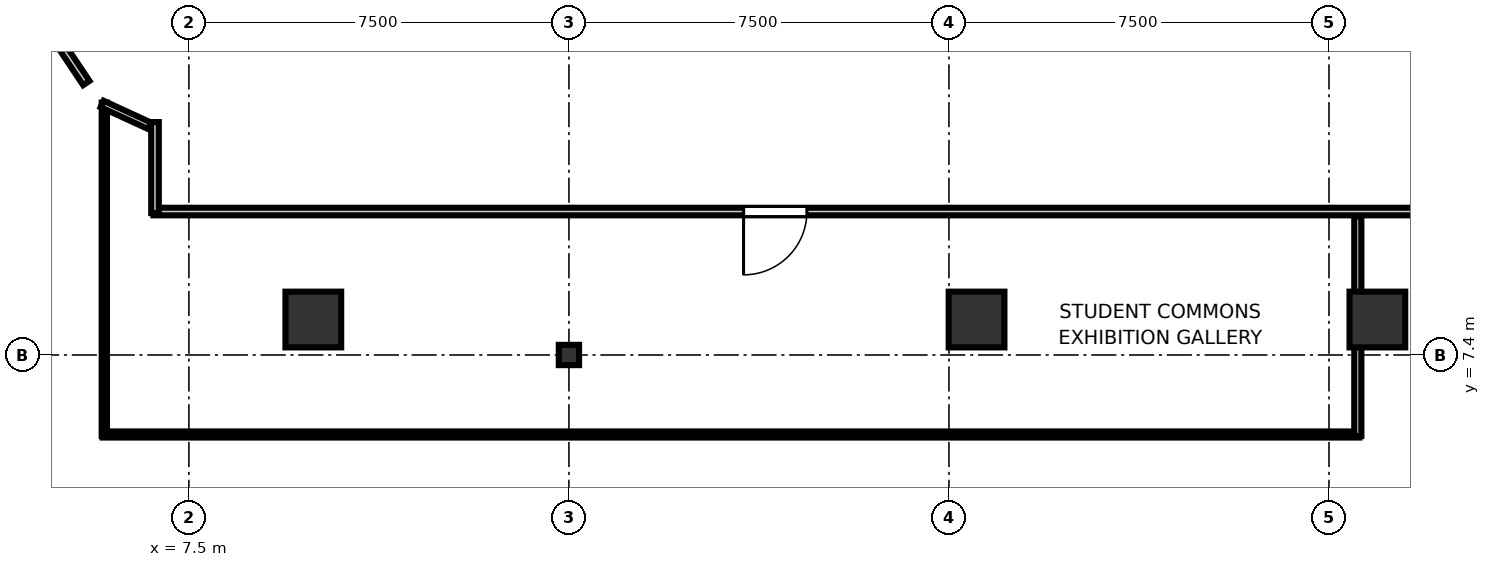
"""IFC4 building model, lengths in metres.
Left out: names, types, materials, properties, quantities, classifications, styles, units other than length and angle.
Written with IfcOpenShell. Run it as: python <this file> out.ifc"""

import sys

from ifc_helpers import new_model, si_unit, direction, frame, frame_2d, origin, origin_2d, place, context, subcontext, project, spatial, rectangle, i_section, extrude, element, fill, save


model = new_model("IFC4")
c1 = context("Model", 3, precision=1e-05, world=origin(), true_north=direction((0.0, 1.0)))
c2 = subcontext(c1, "Body", "Model", "MODEL_VIEW")
j1 = project(units=[si_unit("LENGTHUNIT", "METRE"), si_unit("PLANEANGLEUNIT", "RADIAN")], contexts=[c1])
p1 = place(None, origin())
s1 = spatial("IfcSite", under=j1, at=p1, CompositionType="ELEMENT")
p2 = place(p1, origin())
s2 = spatial("IfcBuilding", under=s1, at=p2, CompositionType="ELEMENT")
p3 = place(p2, frame((0.0, 0.0, 6.0)))
s3 = spatial("IfcBuildingStorey", under=s2, at=p3, CompositionType="ELEMENT", Elevation=6.0)
for number, where, z_axis, x_axis in (
    (1, (9.955, 8.1, 0.0), (0.0, 0.0, 1.0), (1.0, 0.0, 0.0)),
    (2, (23.045, 8.1, 0.0), (0.0, 0.0, 1.0), (1.0, 0.0, 0.0)),
    (3, (30.955, 8.1, 0.0), (0.0, 0.0, 1.0), (1.0, 0.0, 0.0)),
):
    element("IfcColumn", number, at=place(p3, frame(where, z_axis=z_axis, x_axis=x_axis)), inside=s3, PredefinedType="COLUMN", context=c2, shape_type="SweptSolid", body=[
        extrude(rectangle(XDim=1.1, YDim=1.1, at=origin_2d()), origin(), (0.0, 0.0, 1.0), 5.0),
    ])
p4 = place(p3, frame((15.0, 7.4, 0.0), z_axis=(0.0, 0.0, 1.0), x_axis=(1.0, 0.0, 0.0)))
e4 = element("IfcColumn", 4, at=p4, inside=s3, PredefinedType="COLUMN", context=c2, shape_type="SweptSolid", body=[
    extrude(i_section(OverallWidth=0.4, OverallDepth=0.4, WebThickness=0.013, FlangeThickness=0.021, at=origin_2d()), origin(), (0.0, 0.0, 1.0), 5.0),
])
p5 = place(p3, frame((1.5, 6.0, 0.0), z_axis=(0.0, 0.0, 1.0), x_axis=(0.707106781187, -0.707106781187, 0.0)))
e5 = element("IfcWall", 5, at=p5, inside=s3, PredefinedType="SOLIDWALL", context=c2, shape_type="SweptSolid", body=[
    extrude(rectangle(XDim=6.364, YDim=0.28, at=frame_2d((3.182, 0.0))), origin(), (0.0, 0.0, 1.0), 4.78),
])
p6 = place(p3, frame((67.2, 10.231, 0.0), z_axis=(0.0, 0.0, 1.0), x_axis=(-1.0, 0.0, 0.0)))
e6 = element("IfcWall", 6, at=p6, inside=s3, PredefinedType="PARTITIONING", context=c2, shape_type="SweptSolid", body=[
    extrude(rectangle(XDim=60.4, YDim=0.15, at=frame_2d((30.2, 0.0))), origin(), (0.0, 0.0, 1.0), 4.1),
])
p7 = place(p6, frame((47.503, 0.0, 0.0)))
e7 = element("IfcOpeningElement", 7, at=p7, cuts=e6, PredefinedType="OPENING", context=c2, shape_type="SweptSolid", body=[
    extrude(rectangle(XDim=1.25, YDim=2.2, at=frame_2d((0.625, 1.1))), frame((0.0, 0.085, 0.0), z_axis=(0.0, -1.0, 0.0), x_axis=(1.0, 0.0, 0.0)), (0.0, 0.0, 1.0), 0.17),
])
p8 = place(p6, frame((16.675, 0.0, 0.0)))
e8 = element("IfcOpeningElement", 8, at=p8, cuts=e6, PredefinedType="OPENING", context=c2, shape_type="SweptSolid", body=[
    extrude(rectangle(XDim=1.25, YDim=2.2, at=frame_2d((0.625, 1.1))), frame((0.0, 0.085, 0.0), z_axis=(0.0, -1.0, 0.0), x_axis=(1.0, 0.0, 0.0)), (0.0, 0.0, 1.0), 0.17),
])
p9 = place(p6, frame((4.447, 0.0, 0.0)))
e9 = element("IfcOpeningElement", 9, at=p9, cuts=e6, PredefinedType="OPENING", context=c2, shape_type="SweptSolid", body=[
    extrude(rectangle(XDim=1.25, YDim=2.2, at=frame_2d((0.625, 1.1))), frame((0.0, 0.085, 0.0), z_axis=(0.0, -1.0, 0.0), x_axis=(1.0, 0.0, 0.0)), (0.0, 0.0, 1.0), 0.17),
])
p10 = place(p3, frame((6.831, 10.2, 0.0), z_axis=(0.0, 0.0, 1.0), x_axis=(0.0, 1.0, 0.0)))
e10 = element("IfcWall", 10, at=p10, inside=s3, PredefinedType="PARTITIONING", context=c2, shape_type="SweptSolid", body=[
    extrude(rectangle(XDim=1.796, YDim=0.15, at=frame_2d((0.898, 0.0))), origin(), (0.0, 0.0, 1.0), 4.1),
])
p11 = place(p3, frame((5.475, 12.767, 0.0), z_axis=(0.0, 0.0, 1.0), x_axis=(-0.555546297918, 0.831485604728, 0.0)))
e11 = element("IfcWall", 11, at=p11, inside=s3, PredefinedType="PARTITIONING", context=c2, shape_type="SweptSolid", body=[
    extrude(rectangle(XDim=1.132, YDim=0.15, at=frame_2d((0.566, 0.0))), origin(), (0.0, 0.0, 1.0), 4.1),
])
p12 = place(p3, frame((30.6, 5.831, 0.0), z_axis=(0.0, 0.0, 1.0), x_axis=(-1.0, 0.0, 0.0)))
e12 = element("IfcWall", 12, at=p12, inside=s3, PredefinedType="PARTITIONING", context=c2, shape_type="SweptSolid", body=[
    extrude(rectangle(XDim=24.8, YDim=0.12, at=frame_2d((12.4, 0.0))), origin(), (0.0, 0.0, 1.0), 4.1),
])
p13 = place(p3, frame((5.831, 5.8, 0.0), z_axis=(0.0, 0.0, 1.0), x_axis=(0.0, 1.0, 0.0)))
e13 = element("IfcWall", 13, at=p13, inside=s3, PredefinedType="PARTITIONING", context=c2, shape_type="SweptSolid", body=[
    extrude(rectangle(XDim=6.581, YDim=0.105, at=frame_2d((3.291, 0.0))), origin(), (0.0, 0.0, 1.0), 4.1),
])
p14 = place(p3, frame((5.787, 12.353, 0.0), z_axis=(0.0, 0.0, 1.0), x_axis=(0.908698668485, -0.417452667849, 0.0)))
e14 = element("IfcWall", 14, at=p14, inside=s3, PredefinedType="PARTITIONING", context=c2, shape_type="SweptSolid", body=[
    extrude(rectangle(XDim=1.032, YDim=0.14, at=frame_2d((0.516, 0.0))), origin(), (0.0, 0.0, 1.0), 4.1),
])
p15 = place(p3, frame((30.569, 10.138, 0.0), z_axis=(0.0, 0.0, 1.0), x_axis=(0.0, -1.0, 0.0)))
e15 = element("IfcWall", 15, at=p15, inside=s3, PredefinedType="PARTITIONING", context=c2, shape_type="SweptSolid", body=[
    extrude(rectangle(XDim=4.338, YDim=0.14, at=frame_2d((2.169, 0.0))), origin(), (0.0, 0.0, 1.0), 4.1),
])
p16 = place(p7, origin())
e16 = element("IfcDoor", 16, at=p16, inside=s3, OperationType="SINGLE_SWING_RIGHT", PredefinedType="DOOR", context=c2, shape_type="SweptSolid", body=[
    extrude(rectangle(XDim=1.25, YDim=2.2, at=frame_2d((0.625, 1.1))), frame((0.0, 0.025, 0.0), z_axis=(0.0, -1.0, 0.0), x_axis=(1.0, 0.0, 0.0)), (0.0, 0.0, 1.0), 0.05),
])
fill(e7, e16)
save(model, sys.argv[1])
